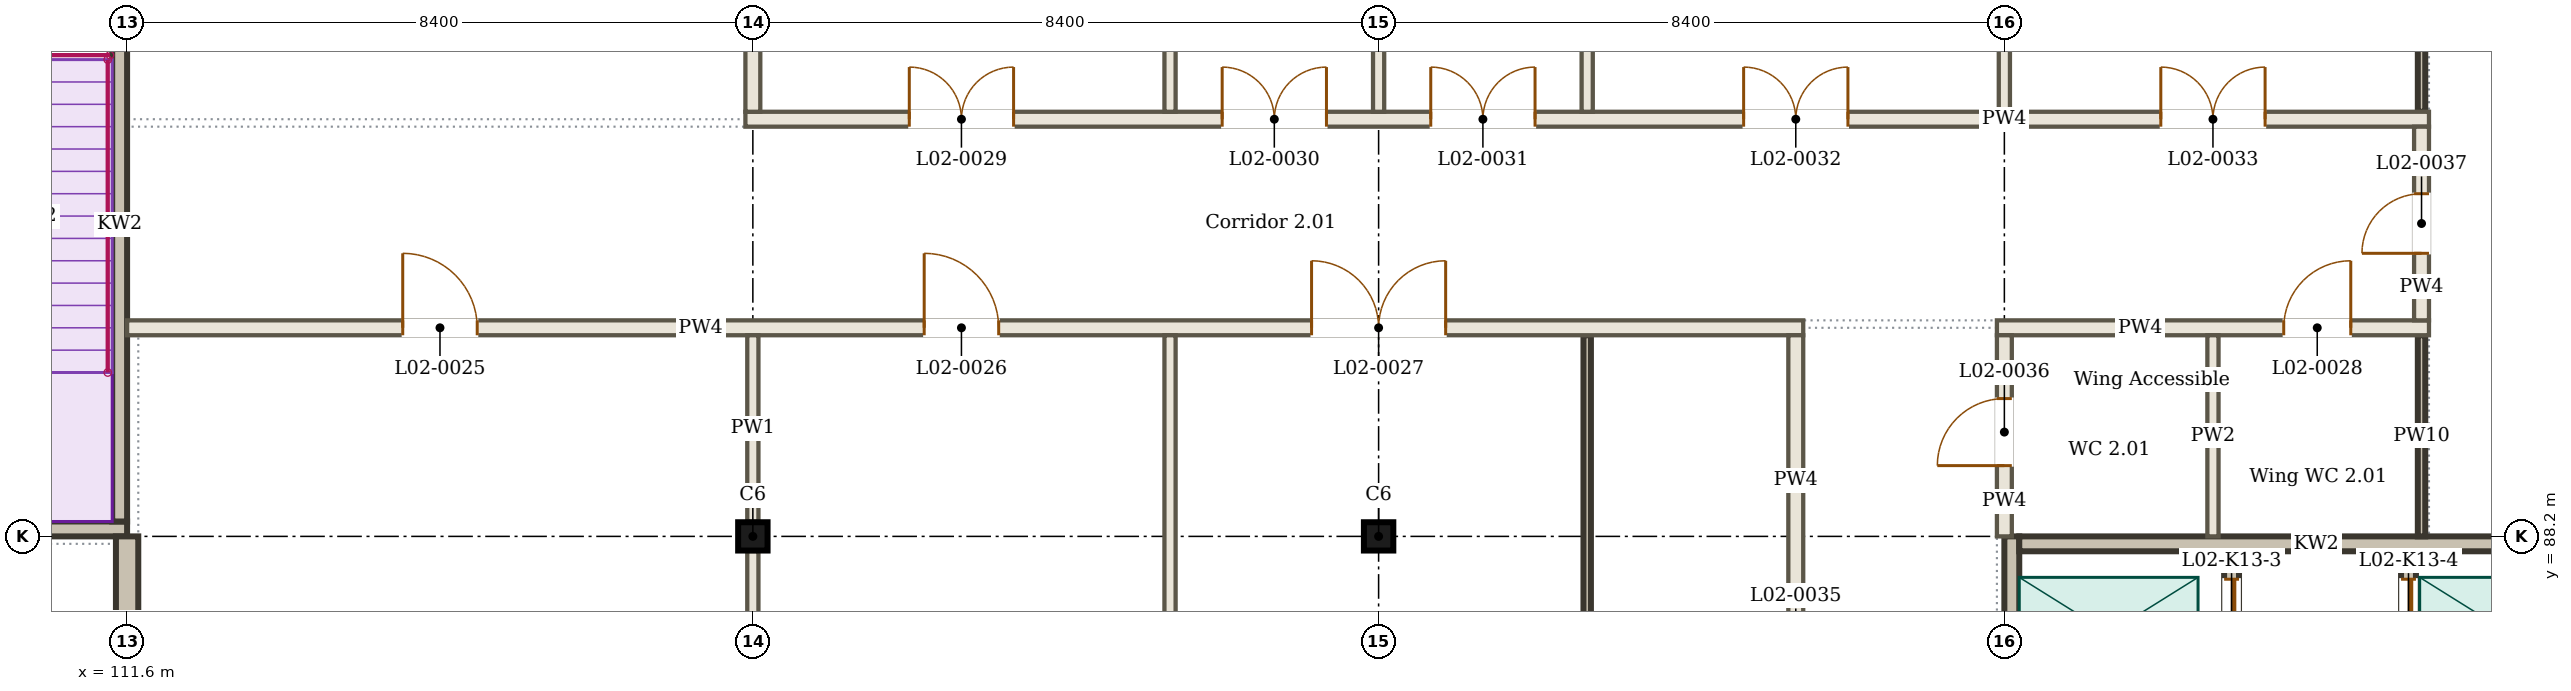
"""IFC4 building model, lengths in metres.
Left out: names, types, materials, properties, quantities, classifications, styles, units other than length and angle.
Written with IfcOpenShell. Run it as: python <this file> out.ifc"""

import sys

from ifc_helpers import new_model, si_unit, direction, frame, frame_2d, origin, origin_2d, place, context, subcontext, project, spatial, rectangle, i_section, extrude, element, fill, save


model = new_model("IFC4")
c1 = context("Model", 3, precision=1e-05, world=origin(), true_north=direction((0.0, 1.0)))
c2 = subcontext(c1, "Body", "Model", "MODEL_VIEW")
j1 = project(units=[si_unit("LENGTHUNIT", "METRE"), si_unit("PLANEANGLEUNIT", "RADIAN")], contexts=[c1])
p1 = place(None, origin())
s1 = spatial("IfcSite", under=j1, at=p1, CompositionType="ELEMENT")
p2 = place(p1, origin())
s2 = spatial("IfcBuilding", under=s1, at=p2, CompositionType="ELEMENT")
p3 = place(p2, frame((0.0, 0.0, 9.0)))
s3 = spatial("IfcBuildingStorey", under=s2, at=p3, CompositionType="ELEMENT", Elevation=9.0)
for number, where, z_axis, x_axis in (
    (1, (120.0, 88.2, 0.0), (0.0, 0.0, 1.0), (1.0, 0.0, 0.0)),
    (2, (128.4, 88.2, 0.0), (0.0, 0.0, 1.0), (1.0, 0.0, 0.0)),
):
    element("IfcColumn", number, at=place(p3, frame(where, z_axis=z_axis, x_axis=x_axis)), inside=s3, PredefinedType="COLUMN", context=c2, shape_type="SweptSolid", body=[
        extrude(i_section(OverallWidth=0.395, OverallDepth=0.38, WebThickness=0.019, FlangeThickness=0.03, FilletRadius=0.027, at=origin_2d()), origin(), (0.0, 0.0, 1.0), 4.5),
    ])
p4 = place(p3, frame((111.6, 91.0, 0.0), z_axis=(0.0, 0.0, 1.0), x_axis=(1.0, 0.0, 0.0)))
e3 = element("IfcWall", 3, at=p4, inside=s3, PredefinedType="PARTITIONING", context=c2, shape_type="SweptSolid", body=[
    extrude(rectangle(XDim=22.5, YDim=0.2, at=frame_2d((11.25, 0.0))), origin(), (0.0, 0.0, 1.0), 3.8),
])
p5 = place(p4, frame((3.7, 0.0, 0.0)))
e4 = element("IfcOpeningElement", 4, at=p5, cuts=e3, PredefinedType="OPENING", context=c2, shape_type="SweptSolid", body=[
    extrude(rectangle(XDim=1.0, YDim=2.1, at=frame_2d((0.5, 1.05))), frame((0.0, 0.11, 0.0), z_axis=(0.0, -1.0, 0.0), x_axis=(1.0, 0.0, 0.0)), (0.0, 0.0, 1.0), 0.22),
])
p6 = place(p4, frame((10.7, 0.0, 0.0)))
e5 = element("IfcOpeningElement", 5, at=p6, cuts=e3, PredefinedType="OPENING", context=c2, shape_type="SweptSolid", body=[
    extrude(rectangle(XDim=1.0, YDim=2.1, at=frame_2d((0.5, 1.05))), frame((0.0, 0.11, 0.0), z_axis=(0.0, -1.0, 0.0), x_axis=(1.0, 0.0, 0.0)), (0.0, 0.0, 1.0), 0.22),
])
p7 = place(p4, frame((15.9, 0.0, 0.0)))
e6 = element("IfcOpeningElement", 6, at=p7, cuts=e3, PredefinedType="OPENING", context=c2, shape_type="SweptSolid", body=[
    extrude(rectangle(XDim=1.8, YDim=2.1, at=frame_2d((0.9, 1.05))), frame((0.0, 0.11, 0.0), z_axis=(0.0, -1.0, 0.0), x_axis=(1.0, 0.0, 0.0)), (0.0, 0.0, 1.0), 0.22),
])
p8 = place(p3, frame((136.7, 91.0, 0.0), z_axis=(0.0, 0.0, 1.0), x_axis=(1.0, 0.0, 0.0)))
e7 = element("IfcWall", 7, at=p8, inside=s3, PredefinedType="PARTITIONING", context=c2, shape_type="SweptSolid", body=[
    extrude(rectangle(XDim=5.8, YDim=0.2, at=frame_2d((2.9, 0.0))), origin(), (0.0, 0.0, 1.0), 3.8),
])
p9 = place(p8, frame((3.85, 0.0, 0.0)))
e8 = element("IfcOpeningElement", 8, at=p9, cuts=e7, PredefinedType="OPENING", context=c2, shape_type="SweptSolid", body=[
    extrude(rectangle(XDim=0.9, YDim=2.1, at=frame_2d((0.45, 1.05))), frame((0.0, 0.11, 0.0), z_axis=(0.0, -1.0, 0.0), x_axis=(1.0, 0.0, 0.0)), (0.0, 0.0, 1.0), 0.22),
])
p10 = place(p3, frame((119.9, 93.8, 0.0), z_axis=(0.0, 0.0, 1.0), x_axis=(1.0, 0.0, 0.0)))
e9 = element("IfcWall", 9, at=p10, inside=s3, PredefinedType="PARTITIONING", context=c2, shape_type="SweptSolid", body=[
    extrude(rectangle(XDim=22.6, YDim=0.2, at=frame_2d((11.3, 0.0))), origin(), (0.0, 0.0, 1.0), 3.8),
])
p11 = place(p10, frame((2.2, 0.0, 0.0)))
e10 = element("IfcOpeningElement", 10, at=p11, cuts=e9, PredefinedType="OPENING", context=c2, shape_type="SweptSolid", body=[
    extrude(rectangle(XDim=1.4, YDim=2.1, at=frame_2d((0.7, 1.05))), frame((0.0, 0.11, 0.0), z_axis=(0.0, -1.0, 0.0), x_axis=(1.0, 0.0, 0.0)), (0.0, 0.0, 1.0), 0.22),
])
p12 = place(p10, frame((6.4, 0.0, 0.0)))
e11 = element("IfcOpeningElement", 11, at=p12, cuts=e9, PredefinedType="OPENING", context=c2, shape_type="SweptSolid", body=[
    extrude(rectangle(XDim=1.4, YDim=2.1, at=frame_2d((0.7, 1.05))), frame((0.0, 0.11, 0.0), z_axis=(0.0, -1.0, 0.0), x_axis=(1.0, 0.0, 0.0)), (0.0, 0.0, 1.0), 0.22),
])
p13 = place(p10, frame((9.2, 0.0, 0.0)))
e12 = element("IfcOpeningElement", 12, at=p13, cuts=e9, PredefinedType="OPENING", context=c2, shape_type="SweptSolid", body=[
    extrude(rectangle(XDim=1.4, YDim=2.1, at=frame_2d((0.7, 1.05))), frame((0.0, 0.11, 0.0), z_axis=(0.0, -1.0, 0.0), x_axis=(1.0, 0.0, 0.0)), (0.0, 0.0, 1.0), 0.22),
])
p14 = place(p10, frame((13.4, 0.0, 0.0)))
e13 = element("IfcOpeningElement", 13, at=p14, cuts=e9, PredefinedType="OPENING", context=c2, shape_type="SweptSolid", body=[
    extrude(rectangle(XDim=1.4, YDim=2.1, at=frame_2d((0.7, 1.05))), frame((0.0, 0.11, 0.0), z_axis=(0.0, -1.0, 0.0), x_axis=(1.0, 0.0, 0.0)), (0.0, 0.0, 1.0), 0.22),
])
p15 = place(p10, frame((19.0, 0.0, 0.0)))
e14 = element("IfcOpeningElement", 14, at=p15, cuts=e9, PredefinedType="OPENING", context=c2, shape_type="SweptSolid", body=[
    extrude(rectangle(XDim=1.4, YDim=2.1, at=frame_2d((0.7, 1.05))), frame((0.0, 0.11, 0.0), z_axis=(0.0, -1.0, 0.0), x_axis=(1.0, 0.0, 0.0)), (0.0, 0.0, 1.0), 0.22),
])
p16 = place(p3, frame((111.6, 85.9, 0.0), z_axis=(0.0, 0.0, 1.0), x_axis=(0.0, 1.0, 0.0)))
e15 = element("IfcWall", 15, at=p16, inside=s3, PredefinedType="SOLIDWALL", context=c2, shape_type="SweptSolid", body=[
    extrude(rectangle(XDim=2.3, YDim=0.3, at=frame_2d((1.15, 0.0))), origin(), (0.0, 0.0, 1.0), 3.8),
])
p17 = place(p3, frame((120.0, 80.025, 0.0), z_axis=(0.0, 0.0, 1.0), x_axis=(0.0, 1.0, 0.0)))
e16 = element("IfcWall", 16, at=p17, inside=s3, PredefinedType="PARTITIONING", context=c2, shape_type="SweptSolid", body=[
    extrude(rectangle(XDim=7.978, YDim=0.15, at=frame_2d((3.989, 0.0))), origin(), (0.0, 0.0, 1.0), 3.8),
])
p18 = place(p3, frame((120.0, 88.397, 0.0), z_axis=(0.0, 0.0, 1.0), x_axis=(0.0, 1.0, 0.0)))
e17 = element("IfcWall", 17, at=p18, inside=s3, PredefinedType="PARTITIONING", context=c2, shape_type="SweptSolid", body=[
    extrude(rectangle(XDim=2.502, YDim=0.15, at=frame_2d((1.251, 0.0))), origin(), (0.0, 0.0, 1.0), 3.8),
])
p19 = place(p3, frame((120.0, 93.9, 0.0), z_axis=(0.0, 0.0, 1.0), x_axis=(0.0, 1.0, 0.0)))
e18 = element("IfcWall", 18, at=p19, inside=s3, PredefinedType="PARTITIONING", context=c2, shape_type="SweptSolid", body=[
    extrude(rectangle(XDim=2.7, YDim=0.2, at=frame_2d((1.35, 0.0))), origin(), (0.0, 0.0, 1.0), 3.8),
])
for number, where, z_axis, x_axis in (
    (19, (125.6, 80.025, 0.0), (0.0, 0.0, 1.0), (0.0, 1.0, 0.0)),
    (20, (125.6, 93.9, 0.0), (0.0, 0.0, 1.0), (0.0, 1.0, 0.0)),
):
    element("IfcWall", number, at=place(p3, frame(where, z_axis=z_axis, x_axis=x_axis)), inside=s3, PredefinedType="PARTITIONING", context=c2, shape_type="SweptSolid", body=[
        extrude(rectangle(XDim=10.875, YDim=0.15, at=frame_2d((5.438, 0.0))), origin(), (0.0, 0.0, 1.0), 3.8),
    ])
p20 = place(p3, frame((128.4, 93.9, 0.0), z_axis=(0.0, 0.0, 1.0), x_axis=(0.0, 1.0, 0.0)))
e21 = element("IfcWall", 21, at=p20, inside=s3, PredefinedType="PARTITIONING", context=c2, shape_type="SweptSolid", body=[
    extrude(rectangle(XDim=2.503, YDim=0.15, at=frame_2d((1.251, 0.0))), origin(), (0.0, 0.0, 1.0), 3.8),
])
p21 = place(p3, frame((131.2, 80.025, 0.0), z_axis=(0.0, 0.0, 1.0), x_axis=(0.0, 1.0, 0.0)))
e22 = element("IfcWall", 22, at=p21, inside=s3, PredefinedType="SOLIDWALL", context=c2, shape_type="SweptSolid", body=[
    extrude(rectangle(XDim=10.875, YDim=0.1, at=frame_2d((5.438, 0.0))), origin(), (0.0, 0.0, 1.0), 3.8),
])
p22 = place(p3, frame((131.2, 93.9, 0.0), z_axis=(0.0, 0.0, 1.0), x_axis=(0.0, 1.0, 0.0)))
e23 = element("IfcWall", 23, at=p22, inside=s3, PredefinedType="PARTITIONING", context=c2, shape_type="SweptSolid", body=[
    extrude(rectangle(XDim=10.875, YDim=0.15, at=frame_2d((5.438, 0.0))), origin(), (0.0, 0.0, 1.0), 3.8),
])
p23 = place(p3, frame((134.0, 82.3, 0.0), z_axis=(0.0, 0.0, 1.0), x_axis=(0.0, 1.0, 0.0)))
e24 = element("IfcWall", 24, at=p23, inside=s3, PredefinedType="PARTITIONING", context=c2, shape_type="SweptSolid", body=[
    extrude(rectangle(XDim=8.6, YDim=0.2, at=frame_2d((4.3, 0.0))), origin(), (0.0, 0.0, 1.0), 3.8),
])
p24 = place(p23, frame((3.9, 0.0, 0.0)))
e25 = element("IfcOpeningElement", 25, at=p24, cuts=e24, PredefinedType="OPENING", context=c2, shape_type="SweptSolid", body=[
    extrude(rectangle(XDim=0.8, YDim=2.1, at=frame_2d((0.4, 1.05))), frame((0.0, 0.11, 0.0), z_axis=(0.0, -1.0, 0.0), x_axis=(1.0, 0.0, 0.0)), (0.0, 0.0, 1.0), 0.22),
])
p25 = place(p3, frame((136.8, 88.2, 0.0), z_axis=(0.0, 0.0, 1.0), x_axis=(0.0, 1.0, 0.0)))
e26 = element("IfcWall", 26, at=p25, inside=s3, PredefinedType="PARTITIONING", context=c2, shape_type="SweptSolid", body=[
    extrude(rectangle(XDim=2.7, YDim=0.2, at=frame_2d((1.35, 0.0))), origin(), (0.0, 0.0, 1.0), 3.8),
])
p26 = place(p25, frame((0.95, 0.0, 0.0)))
e27 = element("IfcOpeningElement", 27, at=p26, cuts=e26, PredefinedType="OPENING", context=c2, shape_type="SweptSolid", body=[
    extrude(rectangle(XDim=0.9, YDim=2.1, at=frame_2d((0.45, 1.05))), frame((0.0, 0.11, 0.0), z_axis=(0.0, -1.0, 0.0), x_axis=(1.0, 0.0, 0.0)), (0.0, 0.0, 1.0), 0.22),
])
p27 = place(p3, frame((136.8, 93.9, 0.0), z_axis=(0.0, 0.0, 1.0), x_axis=(0.0, 1.0, 0.0)))
e28 = element("IfcWall", 28, at=p27, inside=s3, PredefinedType="PARTITIONING", context=c2, shape_type="SweptSolid", body=[
    extrude(rectangle(XDim=2.503, YDim=0.15, at=frame_2d((1.251, 0.0))), origin(), (0.0, 0.0, 1.0), 3.8),
])
p28 = place(p3, frame((139.6, 88.2, 0.0), z_axis=(0.0, 0.0, 1.0), x_axis=(0.0, 1.0, 0.0)))
e29 = element("IfcWall", 29, at=p28, inside=s3, PredefinedType="PARTITIONING", context=c2, shape_type="SweptSolid", body=[
    extrude(rectangle(XDim=2.7, YDim=0.15, at=frame_2d((1.35, 0.0))), origin(), (0.0, 0.0, 1.0), 3.95),
])
p29 = place(p3, frame((142.4, 88.2, 0.0), z_axis=(0.0, 0.0, 1.0), x_axis=(0.0, 1.0, 0.0)))
e30 = element("IfcWall", 30, at=p29, inside=s3, PredefinedType="SOLIDWALL", context=c2, shape_type="SweptSolid", body=[
    extrude(rectangle(XDim=2.7, YDim=0.1, at=frame_2d((1.35, 0.0))), origin(), (0.0, 0.0, 1.0), 3.95),
])
p30 = place(p3, frame((142.4, 91.1, 0.0), z_axis=(0.0, 0.0, 1.0), x_axis=(0.0, 1.0, 0.0)))
e31 = element("IfcWall", 31, at=p30, inside=s3, PredefinedType="PARTITIONING", context=c2, shape_type="SweptSolid", body=[
    extrude(rectangle(XDim=2.6, YDim=0.2, at=frame_2d((1.3, 0.0))), origin(), (0.0, 0.0, 1.0), 3.95),
])
p31 = place(p30, frame((0.9, 0.0, 0.0)))
e32 = element("IfcOpeningElement", 32, at=p31, cuts=e31, PredefinedType="OPENING", context=c2, shape_type="SweptSolid", body=[
    extrude(rectangle(XDim=0.8, YDim=2.1, at=frame_2d((0.4, 1.05))), frame((0.0, 0.11, 0.0), z_axis=(0.0, -1.0, 0.0), x_axis=(1.0, 0.0, 0.0)), (0.0, 0.0, 1.0), 0.22),
])
p32 = place(p3, frame((142.4, 93.9, 0.0), z_axis=(0.0, 0.0, 1.0), x_axis=(0.0, 1.0, 0.0)))
e33 = element("IfcWall", 33, at=p32, inside=s3, PredefinedType="SOLIDWALL", context=c2, shape_type="SweptSolid", body=[
    extrude(rectangle(XDim=10.875, YDim=0.1, at=frame_2d((5.438, 0.0))), origin(), (0.0, 0.0, 1.0), 3.8),
])
p33 = place(p3, frame((111.6, 88.3, 0.0), z_axis=(0.0, 0.0, 1.0), x_axis=(-1.0, 0.0, 0.0)))
e34 = element("IfcWall", 34, at=p33, inside=s3, PredefinedType="SOLIDWALL", context=c2, shape_type="SweptSolid", body=[
    extrude(rectangle(XDim=8.4, YDim=0.2, at=frame_2d((4.2, 0.0))), origin(), (0.0, 0.0, 1.0), 4.5),
])
p34 = place(p33, frame((4.725, 0.0, 0.0)))
e35 = element("IfcOpeningElement", 35, at=p34, cuts=e34, PredefinedType="OPENING", context=c2, shape_type="SweptSolid", body=[
    extrude(rectangle(XDim=1.3, YDim=2.1, at=frame_2d((0.65, 1.05))), frame((0.0, 0.11, 0.0), z_axis=(0.0, -1.0, 0.0), x_axis=(1.0, 0.0, 0.0)), (0.0, 0.0, 1.0), 0.22),
])
p35 = place(p3, frame((111.5, 88.4, 0.0), z_axis=(0.0, 0.0, 1.0), x_axis=(0.0, 1.0, 0.0)))
e36 = element("IfcWall", 36, at=p35, inside=s3, PredefinedType="SOLIDWALL", context=c2, shape_type="SweptSolid", body=[
    extrude(rectangle(XDim=7.975, YDim=0.2, at=frame_2d((3.988, 0.0))), origin(), (0.0, 0.0, 1.0), 4.5),
])
p36 = place(p3, frame((136.9, 79.8, 0.0), z_axis=(0.0, 0.0, 1.0), x_axis=(0.0, 1.0, 0.0)))
e37 = element("IfcWall", 37, at=p36, inside=s3, PredefinedType="SOLIDWALL", context=c2, shape_type="SweptSolid", body=[
    extrude(rectangle(XDim=8.4, YDim=0.2, at=frame_2d((4.2, 0.0))), origin(), (0.0, 0.0, 1.0), 4.5),
])
p37 = place(p36, frame((4.725, 0.0, 0.0)))
e38 = element("IfcOpeningElement", 38, at=p37, cuts=e37, PredefinedType="OPENING", context=c2, shape_type="SweptSolid", body=[
    extrude(rectangle(XDim=1.3, YDim=2.1, at=frame_2d((0.65, 1.05))), frame((0.0, 0.11, 0.0), z_axis=(0.0, -1.0, 0.0), x_axis=(1.0, 0.0, 0.0)), (0.0, 0.0, 1.0), 0.22),
])
p38 = place(p3, frame((137.0, 88.1, 0.0), z_axis=(0.0, 0.0, 1.0), x_axis=(1.0, 0.0, 0.0)))
e39 = element("IfcWall", 39, at=p38, inside=s3, PredefinedType="SOLIDWALL", context=c2, shape_type="SweptSolid", body=[
    extrude(rectangle(XDim=7.975, YDim=0.2, at=frame_2d((3.988, 0.0))), origin(), (0.0, 0.0, 1.0), 4.5),
])
p39 = place(p3, frame((139.85, 86.15, 0.0), z_axis=(0.0, 0.0, 1.0), x_axis=(0.0, 1.0, 0.0)))
e40 = element("IfcWall", 40, at=p39, inside=s3, PredefinedType="SOLIDWALL", context=c2, shape_type="SweptSolid", body=[
    extrude(rectangle(XDim=1.85, YDim=0.2, at=frame_2d((0.925, 0.0))), origin(), (0.0, 0.0, 1.0), 4.5),
])
p40 = place(p39, frame((0.375, 0.0, 0.0)))
e41 = element("IfcOpeningElement", 41, at=p40, cuts=e40, PredefinedType="OPENING", context=c2, shape_type="SweptSolid", body=[
    extrude(rectangle(XDim=1.1, YDim=2.1, at=frame_2d((0.55, 1.05))), frame((0.0, 0.11, 0.0), z_axis=(0.0, -1.0, 0.0), x_axis=(1.0, 0.0, 0.0)), (0.0, 0.0, 1.0), 0.22),
])
p41 = place(p3, frame((142.225, 86.15, 0.0), z_axis=(0.0, 0.0, 1.0), x_axis=(0.0, 1.0, 0.0)))
e42 = element("IfcWall", 42, at=p41, inside=s3, PredefinedType="SOLIDWALL", context=c2, shape_type="SweptSolid", body=[
    extrude(rectangle(XDim=1.85, YDim=0.2, at=frame_2d((0.925, 0.0))), origin(), (0.0, 0.0, 1.0), 4.5),
])
p42 = place(p41, frame((0.375, 0.0, 0.0)))
e43 = element("IfcOpeningElement", 43, at=p42, cuts=e42, PredefinedType="OPENING", context=c2, shape_type="SweptSolid", body=[
    extrude(rectangle(XDim=1.1, YDim=2.1, at=frame_2d((0.55, 1.05))), frame((0.0, 0.11, 0.0), z_axis=(0.0, -1.0, 0.0), x_axis=(1.0, 0.0, 0.0)), (0.0, 0.0, 1.0), 0.22),
])
p43 = place(p5, origin())
e44 = element("IfcDoor", 44, at=p43, inside=s3, OperationType="SINGLE_SWING_LEFT", PredefinedType="DOOR", context=c2, shape_type="SweptSolid", body=[
    extrude(rectangle(XDim=1.0, YDim=2.1, at=frame_2d((0.5, 1.05))), frame((0.0, 0.025, 0.0), z_axis=(0.0, -1.0, 0.0), x_axis=(1.0, 0.0, 0.0)), (0.0, 0.0, 1.0), 0.05),
])
fill(e4, e44)
p44 = place(p6, origin())
e45 = element("IfcDoor", 45, at=p44, inside=s3, OperationType="SINGLE_SWING_LEFT", PredefinedType="DOOR", context=c2, shape_type="SweptSolid", body=[
    extrude(rectangle(XDim=1.0, YDim=2.1, at=frame_2d((0.5, 1.05))), frame((0.0, 0.025, 0.0), z_axis=(0.0, -1.0, 0.0), x_axis=(1.0, 0.0, 0.0)), (0.0, 0.0, 1.0), 0.05),
])
fill(e5, e45)
p45 = place(p7, origin())
e46 = element("IfcDoor", 46, at=p45, inside=s3, OperationType="DOUBLE_DOOR_SINGLE_SWING", PredefinedType="DOOR", context=c2, shape_type="SweptSolid", body=[
    extrude(rectangle(XDim=1.8, YDim=2.1, at=frame_2d((0.9, 1.05))), frame((0.0, 0.025, 0.0), z_axis=(0.0, -1.0, 0.0), x_axis=(1.0, 0.0, 0.0)), (0.0, 0.0, 1.0), 0.05),
])
fill(e6, e46)
p46 = place(p9, origin())
e47 = element("IfcDoor", 47, at=p46, inside=s3, OperationType="SINGLE_SWING_RIGHT", PredefinedType="DOOR", context=c2, shape_type="SweptSolid", body=[
    extrude(rectangle(XDim=0.9, YDim=2.1, at=frame_2d((0.45, 1.05))), frame((0.0, 0.025, 0.0), z_axis=(0.0, -1.0, 0.0), x_axis=(1.0, 0.0, 0.0)), (0.0, 0.0, 1.0), 0.05),
])
fill(e8, e47)
p47 = place(p11, origin())
e48 = element("IfcDoor", 48, at=p47, inside=s3, OperationType="DOUBLE_DOOR_SINGLE_SWING", PredefinedType="DOOR", context=c2, shape_type="SweptSolid", body=[
    extrude(rectangle(XDim=1.4, YDim=2.1, at=frame_2d((0.7, 1.05))), frame((0.0, 0.025, 0.0), z_axis=(0.0, -1.0, 0.0), x_axis=(1.0, 0.0, 0.0)), (0.0, 0.0, 1.0), 0.05),
])
fill(e10, e48)
p48 = place(p12, origin())
e49 = element("IfcDoor", 49, at=p48, inside=s3, OperationType="DOUBLE_DOOR_SINGLE_SWING", PredefinedType="DOOR", context=c2, shape_type="SweptSolid", body=[
    extrude(rectangle(XDim=1.4, YDim=2.1, at=frame_2d((0.7, 1.05))), frame((0.0, 0.025, 0.0), z_axis=(0.0, -1.0, 0.0), x_axis=(1.0, 0.0, 0.0)), (0.0, 0.0, 1.0), 0.05),
])
fill(e11, e49)
p49 = place(p13, origin())
e50 = element("IfcDoor", 50, at=p49, inside=s3, OperationType="DOUBLE_DOOR_SINGLE_SWING", PredefinedType="DOOR", context=c2, shape_type="SweptSolid", body=[
    extrude(rectangle(XDim=1.4, YDim=2.1, at=frame_2d((0.7, 1.05))), frame((0.0, 0.025, 0.0), z_axis=(0.0, -1.0, 0.0), x_axis=(1.0, 0.0, 0.0)), (0.0, 0.0, 1.0), 0.05),
])
fill(e12, e50)
p50 = place(p14, origin())
e51 = element("IfcDoor", 51, at=p50, inside=s3, OperationType="DOUBLE_DOOR_SINGLE_SWING", PredefinedType="DOOR", context=c2, shape_type="SweptSolid", body=[
    extrude(rectangle(XDim=1.4, YDim=2.1, at=frame_2d((0.7, 1.05))), frame((0.0, 0.025, 0.0), z_axis=(0.0, -1.0, 0.0), x_axis=(1.0, 0.0, 0.0)), (0.0, 0.0, 1.0), 0.05),
])
fill(e13, e51)
p51 = place(p15, origin())
e52 = element("IfcDoor", 52, at=p51, inside=s3, OperationType="DOUBLE_DOOR_SINGLE_SWING", PredefinedType="DOOR", context=c2, shape_type="SweptSolid", body=[
    extrude(rectangle(XDim=1.4, YDim=2.1, at=frame_2d((0.7, 1.05))), frame((0.0, 0.025, 0.0), z_axis=(0.0, -1.0, 0.0), x_axis=(1.0, 0.0, 0.0)), (0.0, 0.0, 1.0), 0.05),
])
fill(e14, e52)
p52 = place(p26, origin())
e53 = element("IfcDoor", 53, at=p52, inside=s3, OperationType="SINGLE_SWING_LEFT", PredefinedType="DOOR", context=c2, shape_type="SweptSolid", body=[
    extrude(rectangle(XDim=0.9, YDim=2.1, at=frame_2d((0.45, 1.05))), frame((0.0, 0.025, 0.0), z_axis=(0.0, -1.0, 0.0), x_axis=(1.0, 0.0, 0.0)), (0.0, 0.0, 1.0), 0.05),
])
fill(e27, e53)
p53 = place(p31, origin())
e54 = element("IfcDoor", 54, at=p53, inside=s3, OperationType="SINGLE_SWING_LEFT", PredefinedType="DOOR", context=c2, shape_type="SweptSolid", body=[
    extrude(rectangle(XDim=0.8, YDim=2.1, at=frame_2d((0.4, 1.05))), frame((0.0, 0.025, 0.0), z_axis=(0.0, -1.0, 0.0), x_axis=(1.0, 0.0, 0.0)), (0.0, 0.0, 1.0), 0.05),
])
fill(e32, e54)
p54 = place(p40, origin())
e55 = element("IfcDoor", 55, at=p54, inside=s3, OperationType="DOUBLE_DOOR_SLIDING", PredefinedType="DOOR", context=c2, shape_type="SweptSolid", body=[
    extrude(rectangle(XDim=1.1, YDim=2.1, at=frame_2d((0.55, 1.05))), frame((0.0, 0.025, 0.0), z_axis=(0.0, -1.0, 0.0), x_axis=(1.0, 0.0, 0.0)), (0.0, 0.0, 1.0), 0.05),
])
fill(e41, e55)
p55 = place(p42, origin())
e56 = element("IfcDoor", 56, at=p55, inside=s3, OperationType="DOUBLE_DOOR_SLIDING", PredefinedType="DOOR", context=c2, shape_type="SweptSolid", body=[
    extrude(rectangle(XDim=1.1, YDim=2.1, at=frame_2d((0.55, 1.05))), frame((0.0, 0.025, 0.0), z_axis=(0.0, -1.0, 0.0), x_axis=(1.0, 0.0, 0.0)), (0.0, 0.0, 1.0), 0.05),
])
fill(e43, e56)
save(model, sys.argv[1])
